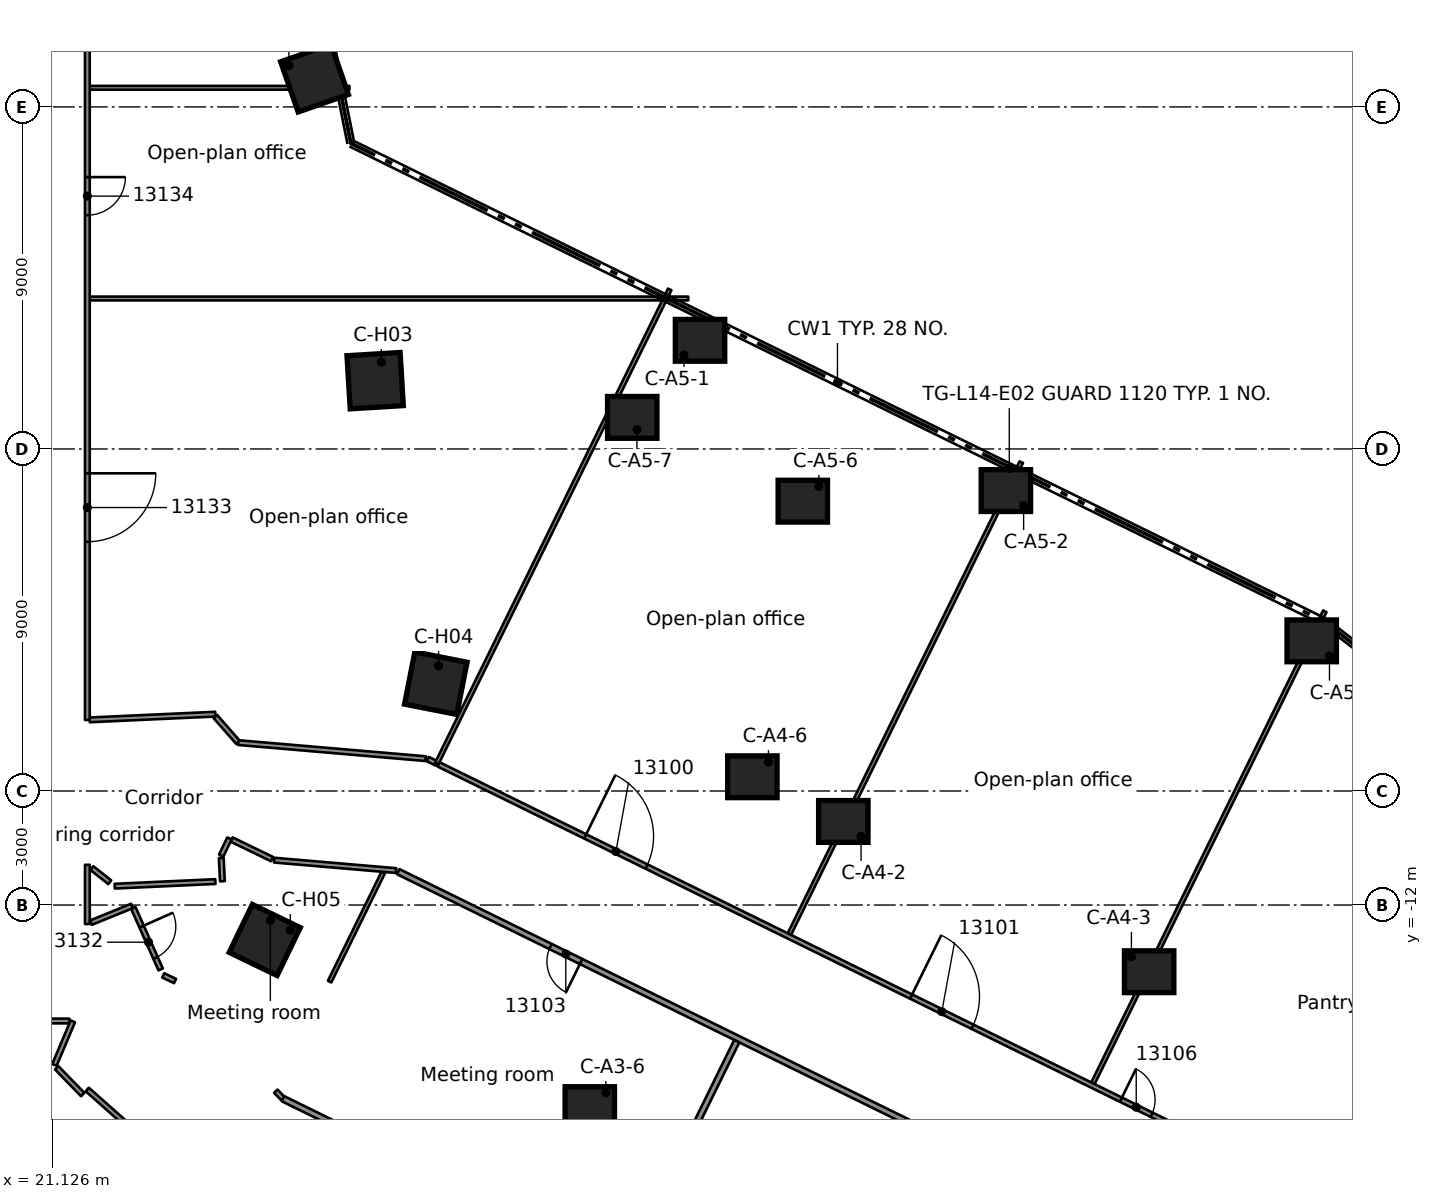
"""IFC4 building model, lengths in metres.
Left out: names, types, materials, properties, quantities, classifications, styles, units other than length and angle.
Written with IfcOpenShell. Run it as: python <this file> out.ifc"""

import sys

from ifc_helpers import new_model, si_unit, direction, frame, frame_2d, origin, origin_2d, place, context, subcontext, project, spatial, rectangle, extrude, element, fill, save


model = new_model("IFC4")
c1 = context("Model", 3, precision=1e-05, world=origin(), true_north=direction((0.0, 1.0)))
c2 = subcontext(c1, "Body", "Model", "MODEL_VIEW")
j1 = project(units=[si_unit("LENGTHUNIT", "METRE"), si_unit("PLANEANGLEUNIT", "RADIAN")], contexts=[c1])
p1 = place(None, origin())
s1 = spatial("IfcSite", under=j1, at=p1, CompositionType="ELEMENT")
p2 = place(p1, origin())
s2 = spatial("IfcBuilding", under=s1, at=p2, CompositionType="ELEMENT")
p3 = place(p2, frame((0.0, 0.0, 62.3)))
s3 = spatial("IfcBuildingStorey", under=s2, at=p3, CompositionType="ELEMENT", Elevation=62.3)
for number, where, z_axis, x_axis in (
    (1, (35.272, -17.331, 0.0), (0.0, 0.0, 1.0), (1.0, 0.0, 0.0)),
    (2, (41.943, -9.801, 0.0), (0.0, 0.0, 1.0), (1.0, 0.0, 0.0)),
    (3, (49.991, -13.755, 0.0), (0.0, 0.0, 1.0), (1.0, 0.0, 0.0)),
    (4, (39.55, -8.625, 0.0), (0.0, 0.0, 1.0), (1.0, 0.0, 0.0)),
    (5, (38.173, 2.859, 0.0), (0.0, 0.0, 1.0), (1.0, 0.0, 0.0)),
    (6, (46.221, -1.095, 0.0), (0.0, 0.0, 1.0), (1.0, 0.0, 0.0)),
    (7, (54.269, -5.049, 0.0), (0.0, 0.0, 1.0), (1.0, 0.0, 0.0)),
    (8, (40.877, -1.374, 0.0), (0.0, 0.0, 1.0), (1.0, 0.0, 0.0)),
    (9, (36.389, 0.831, 0.0), (0.0, 0.0, 1.0), (1.0, 0.0, 0.0)),
):
    element("IfcColumn", number, at=place(p3, frame(where, z_axis=z_axis, x_axis=x_axis)), inside=s3, PredefinedType="COLUMN", context=c2, shape_type="SweptSolid", body=[
        extrude(rectangle(XDim=1.3, YDim=1.1, at=origin_2d()), origin(), (0.0, 0.0, 1.0), 3.5),
    ])
for number, where, z_axis, x_axis in (
    (10, (28.029, 9.758, 0.0), (0.0, 0.0, 1.0), (0.944, 0.329, 0.0)),
    (11, (29.624, 1.797, 0.0), (0.0, 0.0, 1.0), (0.998, 0.061, 0.0)),
    (12, (31.22, -6.163, 0.0), (0.0, 0.0, 1.0), (0.981, -0.194, 0.0)),
    (13, (26.719, -12.92, 0.0), (0.0, 0.0, 1.0), (0.9, -0.435, 0.0)),
):
    element("IfcColumn", number, at=place(p3, frame(where, z_axis=z_axis, x_axis=x_axis)), inside=s3, PredefinedType="COLUMN", context=c2, shape_type="SweptSolid", body=[
        extrude(rectangle(XDim=1.4, YDim=1.4, at=origin_2d()), origin(), (0.0, 0.0, 1.0), 3.5),
    ])
p4 = place(p3, frame((25.419, -7.04, 0.0), z_axis=(0.0, 0.0, 1.0), x_axis=(0.659602225804, -0.751614863953, 0.0)))
e14 = element("IfcWall", 14, at=p4, inside=s3, PredefinedType="PARTITIONING", context=c2, shape_type="SweptSolid", body=[
    extrude(rectangle(XDim=0.913, YDim=0.125, at=frame_2d((0.457, 0.0))), origin(), (0.0, 0.0, 1.0), 3.08),
])
p5 = place(p3, frame((25.575, -10.761, 0.0), z_axis=(0.0, 0.0, 1.0), x_axis=(0.048925805308, -0.998802415683, 0.0)))
e15 = element("IfcWall", 15, at=p5, inside=s3, PredefinedType="PARTITIONING", context=c2, shape_type="SweptSolid", body=[
    extrude(rectangle(XDim=0.614, YDim=0.125, at=frame_2d((0.307, 0.0))), origin(), (0.0, 0.0, 1.0), 3.08),
])
p6 = place(p3, frame((23.26, -12.076, 0.0), z_axis=(0.0, 0.0, 1.0), x_axis=(0.40604891487, -0.913851343892, 0.0)))
e16 = element("IfcWall", 16, at=p6, inside=s3, PredefinedType="PARTITIONING", context=c2, shape_type="SweptSolid", body=[
    extrude(rectangle(XDim=1.771, YDim=0.125, at=frame_2d((0.885, 0.0))), origin(), (0.0, 0.0, 1.0), 3.08),
])
p7 = place(p6, frame((0.538, 0.0, 0.0)))
e17 = element("IfcOpeningElement", 17, at=p7, cuts=e16, PredefinedType="OPENING", context=c2, shape_type="SweptSolid", body=[
    extrude(rectangle(XDim=0.9, YDim=2.1, at=frame_2d((0.45, 1.05))), frame((0.0, 0.073, 0.0), z_axis=(0.0, -1.0, 0.0), x_axis=(1.0, 0.0, 0.0)), (0.0, 0.0, 1.0), 0.145),
])
p8 = place(p3, frame((27.009, -16.899, 0.0), z_axis=(0.0, 0.0, 1.0), x_axis=(0.695952213436, -0.718088098087, 0.0)))
e18 = element("IfcWall", 18, at=p8, inside=s3, PredefinedType="PARTITIONING", context=c2, shape_type="SweptSolid", body=[
    extrude(rectangle(XDim=0.276, YDim=0.125, at=frame_2d((0.138, 0.0))), origin(), (0.0, 0.0, 1.0), 3.08),
])
p9 = place(p3, frame((21.244, -16.283, 0.0), z_axis=(0.0, 0.0, 1.0), x_axis=(0.697348059019, -0.716732645121, 0.0)))
e19 = element("IfcWall", 19, at=p9, inside=s3, PredefinedType="PARTITIONING", context=c2, shape_type="SweptSolid", body=[
    extrude(rectangle(XDim=0.982, YDim=0.125, at=frame_2d((0.491, 0.0))), origin(), (0.0, 0.0, 1.0), 3.08),
])
p10 = place(p3, frame((22.048, -16.854, 0.0), z_axis=(0.0, 0.0, 1.0), x_axis=(0.748412780797, -0.663233224092, 0.0)))
e20 = element("IfcWall", 20, at=p10, inside=s3, PredefinedType="PARTITIONING", context=c2, shape_type="SweptSolid", body=[
    extrude(rectangle(XDim=4.225, YDim=0.125, at=frame_2d((2.112, 0.0))), origin(), (0.0, 0.0, 1.0), 3.08),
])
p11 = place(p3, frame((22.169, -11.028, 0.0), z_axis=(0.0, 0.0, 1.0), x_axis=(0.78486193531, -0.619670672617, 0.0)))
e21 = element("IfcWall", 21, at=p11, inside=s3, PredefinedType="PARTITIONING", context=c2, shape_type="SweptSolid", body=[
    extrude(rectangle(XDim=0.6, YDim=0.125, at=frame_2d((0.3, 0.0))), origin(), (0.0, 0.0, 1.0), 3.08),
])
p12 = place(p3, frame((27.201, -17.097, 0.0), z_axis=(0.0, 0.0, 1.0), x_axis=(0.897485674031, -0.441043608853, 0.0)))
e22 = element("IfcWall", 22, at=p12, inside=s3, PredefinedType="PARTITIONING", context=c2, shape_type="SweptSolid", body=[
    extrude(rectangle(XDim=21.483, YDim=0.15, at=frame_2d((10.742, 0.0))), origin(), (0.0, 0.0, 1.0), 3.08),
])
p13 = place(p12, frame((4.6, 0.0, 0.0)))
e23 = element("IfcOpeningElement", 23, at=p13, cuts=e22, PredefinedType="OPENING", context=c2, shape_type="SweptSolid", body=[
    extrude(rectangle(XDim=0.9, YDim=2.1, at=frame_2d((0.45, 1.05))), frame((0.0, 0.085, 0.0), z_axis=(0.0, -1.0, 0.0), x_axis=(1.0, 0.0, 0.0)), (0.0, 0.0, 1.0), 0.17),
])
p14 = place(p12, frame((14.147, 0.0, 0.0)))
e24 = element("IfcOpeningElement", 24, at=p14, cuts=e22, PredefinedType="OPENING", context=c2, shape_type="SweptSolid", body=[
    extrude(rectangle(XDim=0.9, YDim=2.1, at=frame_2d((0.45, 1.05))), frame((0.0, 0.085, 0.0), z_axis=(0.0, -1.0, 0.0), x_axis=(1.0, 0.0, 0.0)), (0.0, 0.0, 1.0), 0.17),
])
p15 = place(p12, frame((19.797, 0.0, 0.0)))
e25 = element("IfcOpeningElement", 25, at=p15, cuts=e22, PredefinedType="OPENING", context=c2, shape_type="SweptSolid", body=[
    extrude(rectangle(XDim=0.9, YDim=2.1, at=frame_2d((0.45, 1.05))), frame((0.0, 0.085, 0.0), z_axis=(0.0, -1.0, 0.0), x_axis=(1.0, 0.0, 0.0)), (0.0, 0.0, 1.0), 0.17),
])
p16 = place(p3, frame((49.438, -20.559, 0.0), z_axis=(0.0, 0.0, 1.0), x_axis=(-0.897517730631, 0.440978370447, 0.0)))
e26 = element("IfcWall", 26, at=p16, inside=s3, PredefinedType="PARTITIONING", context=c2, shape_type="SweptSolid", body=[
    extrude(rectangle(XDim=21.4, YDim=0.15, at=frame_2d((10.7, 0.0))), origin(), (0.0, 0.0, 1.0), 3.08),
])
p17 = place(p16, frame((16.037, 0.0, 0.0)))
e27 = element("IfcOpeningElement", 27, at=p17, cuts=e26, PredefinedType="OPENING", context=c2, shape_type="SweptSolid", body=[
    extrude(rectangle(XDim=0.9, YDim=2.1, at=frame_2d((0.45, 1.05))), frame((0.0, 0.085, 0.0), z_axis=(0.0, -1.0, 0.0), x_axis=(1.0, 0.0, 0.0)), (0.0, 0.0, 1.0), 0.17),
])
p18 = place(p3, frame((31.291, -8.298, 0.0), z_axis=(0.0, 0.0, 1.0), x_axis=(0.897505006542, -0.441004266683, 0.0)))
e28 = element("IfcWall", 28, at=p18, inside=s3, PredefinedType="PARTITIONING", context=c2, shape_type="SweptSolid", body=[
    extrude(rectangle(XDim=21.757, YDim=0.125, at=frame_2d((10.878, 0.0))), origin(), (0.0, 0.0, 1.0), 3.08),
])
p19 = place(p18, frame((4.3, 0.0, 0.0)))
e29 = element("IfcOpeningElement", 29, at=p19, cuts=e28, PredefinedType="OPENING", context=c2, shape_type="SweptSolid", body=[
    extrude(rectangle(XDim=1.8, YDim=2.1, at=frame_2d((0.9, 1.05))), frame((0.0, 0.073, 0.0), z_axis=(0.0, -1.0, 0.0), x_axis=(1.0, 0.0, 0.0)), (0.0, 0.0, 1.0), 0.145),
])
p20 = place(p18, frame((13.856, 0.0, 0.0)))
e30 = element("IfcOpeningElement", 30, at=p20, cuts=e28, PredefinedType="OPENING", context=c2, shape_type="SweptSolid", body=[
    extrude(rectangle(XDim=1.8, YDim=2.1, at=frame_2d((0.9, 1.05))), frame((0.0, 0.073, 0.0), z_axis=(0.0, -1.0, 0.0), x_axis=(1.0, 0.0, 0.0)), (0.0, 0.0, 1.0), 0.145),
])
p21 = place(p18, frame((20.007, 0.0, 0.0)))
e31 = element("IfcOpeningElement", 31, at=p21, cuts=e28, PredefinedType="OPENING", context=c2, shape_type="SweptSolid", body=[
    extrude(rectangle(XDim=0.9, YDim=2.1, at=frame_2d((0.45, 1.05))), frame((0.0, 0.073, 0.0), z_axis=(0.0, -1.0, 0.0), x_axis=(1.0, 0.0, 0.0)), (0.0, 0.0, 1.0), 0.145),
])
p22 = place(p3, frame((31.007, -8.159, 0.0), z_axis=(0.0, 0.0, 1.0), x_axis=(0.898247549427, -0.439489863305, 0.0)))
e32 = element("IfcWall", 32, at=p22, inside=s3, PredefinedType="PARTITIONING", context=c2, shape_type="SweptSolid", body=[
    extrude(rectangle(XDim=0.266, YDim=0.125, at=frame_2d((0.133, 0.0))), origin(), (0.0, 0.0, 1.0), 3.08),
])
p23 = place(p3, frame((24.048, -13.85, 0.0), z_axis=(0.0, 0.0, 1.0), x_axis=(0.900168222798, -0.43554238676, 0.0)))
e33 = element("IfcWall", 33, at=p23, inside=s3, PredefinedType="PARTITIONING", context=c2, shape_type="SweptSolid", body=[
    extrude(rectangle(XDim=0.344, YDim=0.125, at=frame_2d((0.172, 0.0))), origin(), (0.0, 0.0, 1.0), 3.08),
])
p24 = place(p3, frame((25.845, -10.276, 0.0), z_axis=(0.0, 0.0, 1.0), x_axis=(0.900044500098, -0.435798001193, 0.0)))
e34 = element("IfcWall", 34, at=p24, inside=s3, PredefinedType="PARTITIONING", context=c2, shape_type="SweptSolid", body=[
    extrude(rectangle(XDim=1.184, YDim=0.125, at=frame_2d((0.592, 0.0))), origin(), (0.0, 0.0, 1.0), 3.08),
])
p25 = place(p3, frame((26.967, -10.819, 0.0), z_axis=(0.0, 0.0, 1.0), x_axis=(0.99634849222, -0.085379634874, 0.0)))
e35 = element("IfcWall", 35, at=p25, inside=s3, PredefinedType="PARTITIONING", context=c2, shape_type="SweptSolid", body=[
    extrude(rectangle(XDim=3.22, YDim=0.125, at=frame_2d((1.61, 0.0))), origin(), (0.0, 0.0, 1.0), 3.08),
])
p26 = place(p3, frame((26.021, -7.726, 0.0), z_axis=(0.0, 0.0, 1.0), x_axis=(0.996349284826, -0.085370384947, 0.0)))
e36 = element("IfcWall", 36, at=p26, inside=s3, PredefinedType="PARTITIONING", context=c2, shape_type="SweptSolid", body=[
    extrude(rectangle(XDim=4.953, YDim=0.125, at=frame_2d((2.477, 0.0))), origin(), (0.0, 0.0, 1.0), 3.08),
])
p27 = place(p3, frame((21.576, -15.051, 0.0), z_axis=(0.0, 0.0, 1.0), x_axis=(-1.0, 0.0, 0.0)))
e37 = element("IfcWall", 37, at=p27, inside=s3, PredefinedType="PARTITIONING", context=c2, shape_type="SweptSolid", body=[
    extrude(rectangle(XDim=10.585, YDim=0.125, at=frame_2d((5.292, 0.0))), origin(), (0.0, 0.0, 1.0), 3.08),
])
p28 = place(p27, frame((7.345, 0.0, 0.0)))
e38 = element("IfcOpeningElement", 38, at=p28, cuts=e37, PredefinedType="OPENING", context=c2, shape_type="SweptSolid", body=[
    extrude(rectangle(XDim=0.9, YDim=2.1, at=frame_2d((0.45, 1.05))), frame((0.0, 0.073, 0.0), z_axis=(0.0, -1.0, 0.0), x_axis=(1.0, 0.0, 0.0)), (0.0, 0.0, 1.0), 0.145),
])
p29 = place(p27, frame((2.006, 0.0, 0.0)))
e39 = element("IfcOpeningElement", 39, at=p29, cuts=e37, PredefinedType="OPENING", context=c2, shape_type="SweptSolid", body=[
    extrude(rectangle(XDim=1.1, YDim=2.1, at=frame_2d((0.55, 1.05))), frame((0.0, 0.073, 0.0), z_axis=(0.0, -1.0, 0.0), x_axis=(1.0, 0.0, 0.0)), (0.0, 0.0, 1.0), 0.145),
])
p30 = place(p3, frame((22.113, 3.959, 0.0), z_axis=(0.0, 0.0, 1.0), x_axis=(1.0, 0.0, 0.0)))
e40 = element("IfcWall", 40, at=p30, inside=s3, PredefinedType="PARTITIONING", context=c2, shape_type="SweptSolid", body=[
    extrude(rectangle(XDim=15.749, YDim=0.1, at=frame_2d((7.875, 0.0))), origin(), (0.0, 0.0, 1.0), 3.08),
])
p31 = place(p3, frame((22.113, 9.503, 0.0), z_axis=(0.0, 0.0, 1.0), x_axis=(1.0, 0.0, 0.0)))
e41 = element("IfcWall", 41, at=p31, inside=s3, PredefinedType="PARTITIONING", context=c2, shape_type="SweptSolid", body=[
    extrude(rectangle(XDim=6.834, YDim=0.1, at=frame_2d((3.417, 0.0))), origin(), (0.0, 0.0, 1.0), 3.08),
])
p32 = place(p3, frame((22.771, -11.504, 0.0), z_axis=(0.0, 0.0, 1.0), x_axis=(0.998960167468, 0.045591488373, 0.0)))
e42 = element("IfcWall", 42, at=p32, inside=s3, PredefinedType="PARTITIONING", context=c2, shape_type="SweptSolid", body=[
    extrude(rectangle(XDim=2.651, YDim=0.125, at=frame_2d((1.325, 0.0))), origin(), (0.0, 0.0, 1.0), 3.08),
])
p33 = place(p3, frame((22.113, -7.128, 0.0), z_axis=(0.0, 0.0, 1.0), x_axis=(0.998972341729, 0.045323950183, 0.0)))
e43 = element("IfcWall", 43, at=p33, inside=s3, PredefinedType="PARTITIONING", context=c2, shape_type="SweptSolid", body=[
    extrude(rectangle(XDim=3.307, YDim=0.125, at=frame_2d((1.654, 0.0))), origin(), (0.0, 0.0, 1.0), 3.08),
])
p34 = place(p3, frame((22.147, -12.463, 0.0), z_axis=(0.0, 0.0, 1.0), x_axis=(0.926466577122, 0.376377046956, 0.0)))
e44 = element("IfcWall", 44, at=p34, inside=s3, PredefinedType="PARTITIONING", context=c2, shape_type="SweptSolid", body=[
    extrude(rectangle(XDim=1.164, YDim=0.125, at=frame_2d((0.582, 0.0))), origin(), (0.0, 0.0, 1.0), 3.08),
])
p35 = place(p3, frame((48.512, -16.69, 0.0), z_axis=(0.0, 0.0, 1.0), x_axis=(0.440935300802, 0.897538890804, 0.0)))
e45 = element("IfcWall", 45, at=p35, inside=s3, PredefinedType="PARTITIONING", context=c2, shape_type="SweptSolid", body=[
    extrude(rectangle(XDim=13.837, YDim=0.1, at=frame_2d((6.918, 0.0))), origin(), (0.0, 0.0, 1.0), 3.08),
])
p36 = place(p3, frame((36.251, -21.461, 0.0), z_axis=(0.0, 0.0, 1.0), x_axis=(0.44103082672, 0.89749195533, 0.0)))
e46 = element("IfcWall", 46, at=p36, inside=s3, PredefinedType="PARTITIONING", context=c2, shape_type="SweptSolid", body=[
    extrude(rectangle(XDim=6.55, YDim=0.15, at=frame_2d((3.275, 0.0))), origin(), (0.0, 0.0, 1.0), 3.08),
])
p37 = place(p3, frame((40.524, -12.765, 0.0), z_axis=(0.0, 0.0, 1.0), x_axis=(0.441020089077, 0.897497231768, 0.0)))
e47 = element("IfcWall", 47, at=p37, inside=s3, PredefinedType="PARTITIONING", context=c2, shape_type="SweptSolid", body=[
    extrude(rectangle(XDim=13.836, YDim=0.1, at=frame_2d((6.918, 0.0))), origin(), (0.0, 0.0, 1.0), 3.08),
])
p38 = place(p3, frame((28.426, -14.015, 0.0), z_axis=(0.0, 0.0, 1.0), x_axis=(0.441062549099, 0.897476366141, 0.0)))
e48 = element("IfcWall", 48, at=p38, inside=s3, PredefinedType="PARTITIONING", context=c2, shape_type="SweptSolid", body=[
    extrude(rectangle(XDim=3.197, YDim=0.1, at=frame_2d((1.598, 0.0))), origin(), (0.0, 0.0, 1.0), 3.08),
])
p39 = place(p3, frame((31.246, -8.276, 0.0), z_axis=(0.0, 0.0, 1.0), x_axis=(0.440956509133, 0.897528471445, 0.0)))
e49 = element("IfcWall", 49, at=p39, inside=s3, PredefinedType="PARTITIONING", context=c2, shape_type="SweptSolid", body=[
    extrude(rectangle(XDim=13.899, YDim=0.1, at=frame_2d((6.95, 0.0))), origin(), (0.0, 0.0, 1.0), 3.08),
])
p40 = place(p3, frame((25.572, -10.699, 0.0), z_axis=(0.0, 0.0, 1.0), x_axis=(0.434462039315, 0.900690144497, 0.0)))
e50 = element("IfcWall", 50, at=p40, inside=s3, PredefinedType="PARTITIONING", context=c2, shape_type="SweptSolid", body=[
    extrude(rectangle(XDim=0.5, YDim=0.125, at=frame_2d((0.25, 0.0))), origin(), (0.0, 0.0, 1.0), 3.08),
])
p41 = place(p3, frame((21.185, -16.206, 0.0), z_axis=(0.0, 0.0, 1.0), x_axis=(0.388601478259, 0.921405931767, 0.0)))
e51 = element("IfcWall", 51, at=p41, inside=s3, PredefinedType="PARTITIONING", context=c2, shape_type="SweptSolid", body=[
    extrude(rectangle(XDim=1.243, YDim=0.125, at=frame_2d((0.621, 0.0))), origin(), (0.0, 0.0, 1.0), 3.08),
])
p42 = place(p3, frame((22.051, -12.5, 0.0), z_axis=(0.0, 0.0, 1.0), x_axis=(0.0, 1.0, 0.0)))
e52 = element("IfcWall", 52, at=p42, inside=s3, PredefinedType="PARTITIONING", context=c2, shape_type="SweptSolid", body=[
    extrude(rectangle(XDim=1.558, YDim=0.125, at=frame_2d((0.779, 0.0))), origin(), (0.0, 0.0, 1.0), 3.08),
])
p43 = place(p3, frame((22.051, 15.05, 0.0), z_axis=(0.0, 0.0, 1.0), x_axis=(0.0, -1.0, 0.0)))
e53 = element("IfcWall", 53, at=p43, inside=s3, PredefinedType="PARTITIONING", context=c2, shape_type="SweptSolid", body=[
    extrude(rectangle(XDim=22.181, YDim=0.125, at=frame_2d((11.091, 0.0))), origin(), (0.0, 0.0, 1.0), 3.08),
])
p44 = place(p43, frame((15.691, 0.0, 0.0)))
e54 = element("IfcOpeningElement", 54, at=p44, cuts=e53, PredefinedType="OPENING", context=c2, shape_type="SweptSolid", body=[
    extrude(rectangle(XDim=1.8, YDim=2.1, at=frame_2d((0.9, 1.05))), frame((0.0, 0.073, 0.0), z_axis=(0.0, -1.0, 0.0), x_axis=(1.0, 0.0, 0.0)), (0.0, 0.0, 1.0), 0.145),
])
p45 = place(p43, frame((7.897, 0.0, 0.0)))
e55 = element("IfcOpeningElement", 55, at=p45, cuts=e53, PredefinedType="OPENING", context=c2, shape_type="SweptSolid", body=[
    extrude(rectangle(XDim=1.0, YDim=2.1, at=frame_2d((0.5, 1.05))), frame((0.0, 0.073, 0.0), z_axis=(0.0, -1.0, 0.0), x_axis=(1.0, 0.0, 0.0)), (0.0, 0.0, 1.0), 0.145),
])
p46 = place(p19, origin())
e56 = element("IfcDoor", 56, at=p46, inside=s3, OperationType="DOUBLE_DOOR_SINGLE_SWING", PredefinedType="DOOR", context=c2, shape_type="SweptSolid", body=[
    extrude(rectangle(XDim=1.8, YDim=2.1, at=frame_2d((0.9, 1.05))), frame((0.0, 0.025, 0.0), z_axis=(0.0, -1.0, 0.0), x_axis=(1.0, 0.0, 0.0)), (0.0, 0.0, 1.0), 0.05),
])
fill(e29, e56)
p47 = place(p20, origin())
e57 = element("IfcDoor", 57, at=p47, inside=s3, OperationType="DOUBLE_DOOR_SINGLE_SWING", PredefinedType="DOOR", context=c2, shape_type="SweptSolid", body=[
    extrude(rectangle(XDim=1.8, YDim=2.1, at=frame_2d((0.9, 1.05))), frame((0.0, 0.025, 0.0), z_axis=(0.0, -1.0, 0.0), x_axis=(1.0, 0.0, 0.0)), (0.0, 0.0, 1.0), 0.05),
])
fill(e30, e57)
p48 = place(p17, origin())
e58 = element("IfcDoor", 58, at=p48, inside=s3, OperationType="SINGLE_SWING_RIGHT", PredefinedType="DOOR", context=c2, shape_type="SweptSolid", body=[
    extrude(rectangle(XDim=0.9, YDim=2.1, at=frame_2d((0.45, 1.05))), frame((0.0, 0.025, 0.0), z_axis=(0.0, -1.0, 0.0), x_axis=(1.0, 0.0, 0.0)), (0.0, 0.0, 1.0), 0.05),
])
fill(e27, e58)
p49 = place(p21, origin())
e59 = element("IfcDoor", 59, at=p49, inside=s3, OperationType="SINGLE_SWING_RIGHT", PredefinedType="DOOR", context=c2, shape_type="SweptSolid", body=[
    extrude(rectangle(XDim=0.9, YDim=2.1, at=frame_2d((0.45, 1.05))), frame((0.0, 0.025, 0.0), z_axis=(0.0, -1.0, 0.0), x_axis=(1.0, 0.0, 0.0)), (0.0, 0.0, 1.0), 0.05),
])
fill(e31, e59)
p50 = place(p7, origin())
e60 = element("IfcDoor", 60, at=p50, inside=s3, OperationType="SINGLE_SWING_RIGHT", PredefinedType="DOOR", context=c2, shape_type="SweptSolid", body=[
    extrude(rectangle(XDim=0.9, YDim=2.1, at=frame_2d((0.45, 1.05))), frame((0.0, 0.025, 0.0), z_axis=(0.0, -1.0, 0.0), x_axis=(1.0, 0.0, 0.0)), (0.0, 0.0, 1.0), 0.05),
])
fill(e17, e60)
p51 = place(p44, origin())
e61 = element("IfcDoor", 61, at=p51, inside=s3, OperationType="DOUBLE_DOOR_SINGLE_SWING", PredefinedType="DOOR", context=c2, shape_type="SweptSolid", body=[
    extrude(rectangle(XDim=1.8, YDim=2.1, at=frame_2d((0.9, 1.05))), frame((0.0, 0.025, 0.0), z_axis=(0.0, -1.0, 0.0), x_axis=(1.0, 0.0, 0.0)), (0.0, 0.0, 1.0), 0.05),
])
fill(e54, e61)
p52 = place(p45, origin())
e62 = element("IfcDoor", 62, at=p52, inside=s3, OperationType="SINGLE_SWING_LEFT", PredefinedType="DOOR", context=c2, shape_type="SweptSolid", body=[
    extrude(rectangle(XDim=1.0, YDim=2.1, at=frame_2d((0.5, 1.05))), frame((0.0, 0.025, 0.0), z_axis=(0.0, -1.0, 0.0), x_axis=(1.0, 0.0, 0.0)), (0.0, 0.0, 1.0), 0.05),
])
fill(e55, e62)
save(model, sys.argv[1])
